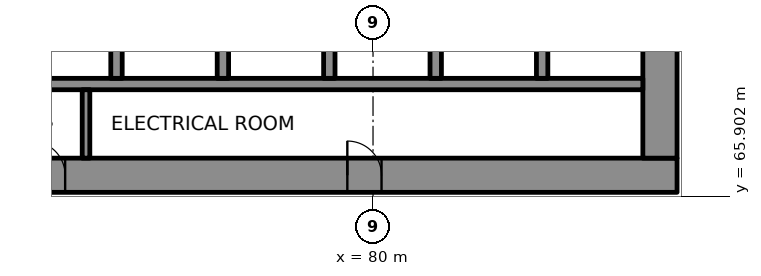
"""IFC4 building model, lengths in metres.
Left out: names, types, materials, properties, quantities, classifications, styles, units other than length and angle.
Written with IfcOpenShell. Run it as: python <this file> out.ifc"""

import sys

from ifc_helpers import new_model, si_unit, direction, frame, frame_2d, origin, place, context, subcontext, project, spatial, rectangle, extrude, element, fill, save


model = new_model("IFC4")
c1 = context("Model", 3, precision=1e-05, world=origin(), true_north=direction((0.0, 1.0)))
c2 = subcontext(c1, "Body", "Model", "MODEL_VIEW")
j1 = project(units=[si_unit("LENGTHUNIT", "METRE"), si_unit("PLANEANGLEUNIT", "RADIAN")], contexts=[c1])
p1 = place(None, origin())
s1 = spatial("IfcSite", under=j1, at=p1, CompositionType="ELEMENT")
p2 = place(p1, origin())
s2 = spatial("IfcBuilding", under=s1, at=p2, CompositionType="ELEMENT")
p3 = place(p2, frame((0.0, 0.0, 35.5)))
s3 = spatial("IfcBuildingStorey", under=s2, at=p3, CompositionType="ELEMENT", Elevation=35.5)
p4 = place(p3, frame((62.0, 66.45, 0.0), z_axis=(0.0, 0.0, 1.0), x_axis=(1.0, 0.0, 0.0)))
e1 = element("IfcWall", 1, at=p4, inside=s3, PredefinedType="SHEAR", context=c2, shape_type="SweptSolid", body=[
    extrude(rectangle(XDim=26.0, YDim=0.9, at=frame_2d((13.0, 0.0))), origin(), (0.0, 0.0, 1.0), 4.3),
])
p5 = place(p4, frame((3.45, 0.0, 0.0)))
e2 = element("IfcOpeningElement", 2, at=p5, cuts=e1, PredefinedType="OPENING", context=c2, shape_type="SweptSolid", body=[
    extrude(rectangle(XDim=0.9, YDim=2.1, at=frame_2d((0.45, 1.05))), frame((0.0, 0.46, 0.0), z_axis=(0.0, -1.0, 0.0), x_axis=(1.0, 0.0, 0.0)), (0.0, 0.0, 1.0), 0.92),
])
p6 = place(p4, frame((5.637, 0.0, 0.0)))
e3 = element("IfcOpeningElement", 3, at=p6, cuts=e1, PredefinedType="OPENING", context=c2, shape_type="SweptSolid", body=[
    extrude(rectangle(XDim=0.9, YDim=2.1, at=frame_2d((0.45, 1.05))), frame((0.0, 0.46, 0.0), z_axis=(0.0, -1.0, 0.0), x_axis=(1.0, 0.0, 0.0)), (0.0, 0.0, 1.0), 0.92),
])
p7 = place(p4, frame((7.212, 0.0, 0.0)))
e4 = element("IfcOpeningElement", 4, at=p7, cuts=e1, PredefinedType="OPENING", context=c2, shape_type="SweptSolid", body=[
    extrude(rectangle(XDim=0.9, YDim=2.1, at=frame_2d((0.45, 1.05))), frame((0.0, 0.46, 0.0), z_axis=(0.0, -1.0, 0.0), x_axis=(1.0, 0.0, 0.0)), (0.0, 0.0, 1.0), 0.92),
])
p8 = place(p4, frame((8.999, 0.0, 0.0)))
e5 = element("IfcOpeningElement", 5, at=p8, cuts=e1, PredefinedType="OPENING", context=c2, shape_type="SweptSolid", body=[
    extrude(rectangle(XDim=0.9, YDim=2.1, at=frame_2d((0.45, 1.05))), frame((0.0, 0.46, 0.0), z_axis=(0.0, -1.0, 0.0), x_axis=(1.0, 0.0, 0.0)), (0.0, 0.0, 1.0), 0.92),
])
p9 = place(p4, frame((17.324, 0.0, 0.0)))
e6 = element("IfcOpeningElement", 6, at=p9, cuts=e1, PredefinedType="OPENING", context=c2, shape_type="SweptSolid", body=[
    extrude(rectangle(XDim=0.9, YDim=2.1, at=frame_2d((0.45, 1.05))), frame((0.0, 0.46, 0.0), z_axis=(0.0, -1.0, 0.0), x_axis=(1.0, 0.0, 0.0)), (0.0, 0.0, 1.0), 0.92),
])
p10 = place(p3, frame((87.55, 66.9, 0.0), z_axis=(0.0, 0.0, 1.0), x_axis=(0.0, 1.0, 0.0)))
e7 = element("IfcWall", 7, at=p10, inside=s3, PredefinedType="SHEAR", context=c2, shape_type="SweptSolid", body=[
    extrude(rectangle(XDim=16.2, YDim=0.9, at=frame_2d((8.1, 0.0))), origin(), (0.0, 0.0, 1.0), 4.3),
])
p11 = place(p10, frame((5.5, 0.0, 0.0)))
e8 = element("IfcOpeningElement", 8, at=p11, cuts=e7, PredefinedType="OPENING", context=c2, shape_type="SweptSolid", body=[
    extrude(rectangle(XDim=1.8, YDim=2.1, at=frame_2d((0.9, 1.05))), frame((0.0, 0.46, 0.0), z_axis=(0.0, -1.0, 0.0), x_axis=(1.0, 0.0, 0.0)), (0.0, 0.0, 1.0), 0.92),
])
p12 = place(p10, frame((11.202, 0.0, 0.0)))
e9 = element("IfcOpeningElement", 9, at=p12, cuts=e7, PredefinedType="OPENING", context=c2, shape_type="SweptSolid", body=[
    extrude(rectangle(XDim=0.9, YDim=2.1, at=frame_2d((0.45, 1.05))), frame((0.0, 0.46, 0.0), z_axis=(0.0, -1.0, 0.0), x_axis=(1.0, 0.0, 0.0)), (0.0, 0.0, 1.0), 0.92),
])
p13 = place(p3, frame((70.35, 68.85, 0.0), z_axis=(0.0, 0.0, 1.0), x_axis=(1.0, 0.0, 0.0)))
e10 = element("IfcWall", 10, at=p13, inside=s3, PredefinedType="SHEAR", context=c2, shape_type="SweptSolid", body=[
    extrude(rectangle(XDim=16.75, YDim=0.3, at=frame_2d((8.375, 0.0))), origin(), (0.0, 0.0, 1.0), 4.3),
])
for number, where, z_axis, x_axis in (
    (11, (73.25, 69.0, 0.0), (0.0, 0.0, 1.0), (0.0, 1.0, 0.0)),
    (12, (76.05, 69.0, 0.0), (0.0, 0.0, 1.0), (0.0, 1.0, 0.0)),
    (13, (78.85, 69.0, 0.0), (0.0, 0.0, 1.0), (0.0, 1.0, 0.0)),
    (14, (81.65, 69.0, 0.0), (0.0, 0.0, 1.0), (0.0, 1.0, 0.0)),
    (15, (84.45, 69.0, 0.0), (0.0, 0.0, 1.0), (0.0, 1.0, 0.0)),
):
    element("IfcWall", number, at=place(p3, frame(where, z_axis=z_axis, x_axis=x_axis)), inside=s3, PredefinedType="SHEAR", context=c2, shape_type="SweptSolid", body=[
        extrude(rectangle(XDim=2.6, YDim=0.3, at=frame_2d((1.3, 0.0))), origin(), (0.0, 0.0, 1.0), 4.3),
    ])
p14 = place(p3, frame((107.504, 60.451, 0.0), z_axis=(0.0, 0.0, 1.0), x_axis=(-0.500000550228, 0.86602508611, 0.0)))
e16 = element("IfcWall", 16, at=p14, inside=s3, PredefinedType="SOLIDWALL", context=c2, shape_type="SweptSolid", body=[
    extrude(rectangle(XDim=57.704, YDim=0.3, at=frame_2d((28.852, 0.0))), origin(), (0.0, 0.0, 1.0), 4.3),
])
p15 = place(p14, frame((0.89, 0.0, 0.8)))
e17 = element("IfcOpeningElement", 17, at=p15, cuts=e16, PredefinedType="OPENING", context=c2, shape_type="SweptSolid", body=[
    extrude(rectangle(XDim=3.0, YDim=2.4, at=frame_2d((1.5, 1.2))), frame((0.0, 0.16, 0.0), z_axis=(0.0, -1.0, 0.0), x_axis=(1.0, 0.0, 0.0)), (0.0, 0.0, 1.0), 0.32),
])
p16 = place(p14, frame((4.67, 0.0, 0.8)))
e18 = element("IfcOpeningElement", 18, at=p16, cuts=e16, PredefinedType="OPENING", context=c2, shape_type="SweptSolid", body=[
    extrude(rectangle(XDim=3.0, YDim=2.4, at=frame_2d((1.5, 1.2))), frame((0.0, 0.16, 0.0), z_axis=(0.0, -1.0, 0.0), x_axis=(1.0, 0.0, 0.0)), (0.0, 0.0, 1.0), 0.32),
])
p17 = place(p14, frame((8.451, 0.0, 0.8)))
e19 = element("IfcOpeningElement", 19, at=p17, cuts=e16, PredefinedType="OPENING", context=c2, shape_type="SweptSolid", body=[
    extrude(rectangle(XDim=3.0, YDim=2.4, at=frame_2d((1.5, 1.2))), frame((0.0, 0.16, 0.0), z_axis=(0.0, -1.0, 0.0), x_axis=(1.0, 0.0, 0.0)), (0.0, 0.0, 1.0), 0.32),
])
p18 = place(p14, frame((12.231, 0.0, 0.8)))
e20 = element("IfcOpeningElement", 20, at=p18, cuts=e16, PredefinedType="OPENING", context=c2, shape_type="SweptSolid", body=[
    extrude(rectangle(XDim=3.0, YDim=2.4, at=frame_2d((1.5, 1.2))), frame((0.0, 0.16, 0.0), z_axis=(0.0, -1.0, 0.0), x_axis=(1.0, 0.0, 0.0)), (0.0, 0.0, 1.0), 0.32),
])
p19 = place(p14, frame((16.011, 0.0, 0.8)))
e21 = element("IfcOpeningElement", 21, at=p19, cuts=e16, PredefinedType="OPENING", context=c2, shape_type="SweptSolid", body=[
    extrude(rectangle(XDim=3.0, YDim=2.4, at=frame_2d((1.5, 1.2))), frame((0.0, 0.16, 0.0), z_axis=(0.0, -1.0, 0.0), x_axis=(1.0, 0.0, 0.0)), (0.0, 0.0, 1.0), 0.32),
])
p20 = place(p14, frame((19.792, 0.0, 0.8)))
e22 = element("IfcOpeningElement", 22, at=p20, cuts=e16, PredefinedType="OPENING", context=c2, shape_type="SweptSolid", body=[
    extrude(rectangle(XDim=3.0, YDim=2.4, at=frame_2d((1.5, 1.2))), frame((0.0, 0.16, 0.0), z_axis=(0.0, -1.0, 0.0), x_axis=(1.0, 0.0, 0.0)), (0.0, 0.0, 1.0), 0.32),
])
p21 = place(p14, frame((23.572, 0.0, 0.8)))
e23 = element("IfcOpeningElement", 23, at=p21, cuts=e16, PredefinedType="OPENING", context=c2, shape_type="SweptSolid", body=[
    extrude(rectangle(XDim=3.0, YDim=2.4, at=frame_2d((1.5, 1.2))), frame((0.0, 0.16, 0.0), z_axis=(0.0, -1.0, 0.0), x_axis=(1.0, 0.0, 0.0)), (0.0, 0.0, 1.0), 0.32),
])
p22 = place(p14, frame((27.352, 0.0, 0.8)))
e24 = element("IfcOpeningElement", 24, at=p22, cuts=e16, PredefinedType="OPENING", context=c2, shape_type="SweptSolid", body=[
    extrude(rectangle(XDim=3.0, YDim=2.4, at=frame_2d((1.5, 1.2))), frame((0.0, 0.16, 0.0), z_axis=(0.0, -1.0, 0.0), x_axis=(1.0, 0.0, 0.0)), (0.0, 0.0, 1.0), 0.32),
])
p23 = place(p14, frame((31.132, 0.0, 0.8)))
e25 = element("IfcOpeningElement", 25, at=p23, cuts=e16, PredefinedType="OPENING", context=c2, shape_type="SweptSolid", body=[
    extrude(rectangle(XDim=3.0, YDim=2.4, at=frame_2d((1.5, 1.2))), frame((0.0, 0.16, 0.0), z_axis=(0.0, -1.0, 0.0), x_axis=(1.0, 0.0, 0.0)), (0.0, 0.0, 1.0), 0.32),
])
p24 = place(p14, frame((34.913, 0.0, 0.8)))
e26 = element("IfcOpeningElement", 26, at=p24, cuts=e16, PredefinedType="OPENING", context=c2, shape_type="SweptSolid", body=[
    extrude(rectangle(XDim=3.0, YDim=2.4, at=frame_2d((1.5, 1.2))), frame((0.0, 0.16, 0.0), z_axis=(0.0, -1.0, 0.0), x_axis=(1.0, 0.0, 0.0)), (0.0, 0.0, 1.0), 0.32),
])
p25 = place(p14, frame((38.693, 0.0, 0.8)))
e27 = element("IfcOpeningElement", 27, at=p25, cuts=e16, PredefinedType="OPENING", context=c2, shape_type="SweptSolid", body=[
    extrude(rectangle(XDim=3.0, YDim=2.4, at=frame_2d((1.5, 1.2))), frame((0.0, 0.16, 0.0), z_axis=(0.0, -1.0, 0.0), x_axis=(1.0, 0.0, 0.0)), (0.0, 0.0, 1.0), 0.32),
])
p26 = place(p14, frame((42.473, 0.0, 0.8)))
e28 = element("IfcOpeningElement", 28, at=p26, cuts=e16, PredefinedType="OPENING", context=c2, shape_type="SweptSolid", body=[
    extrude(rectangle(XDim=3.0, YDim=2.4, at=frame_2d((1.5, 1.2))), frame((0.0, 0.16, 0.0), z_axis=(0.0, -1.0, 0.0), x_axis=(1.0, 0.0, 0.0)), (0.0, 0.0, 1.0), 0.32),
])
p27 = place(p14, frame((46.253, 0.0, 0.8)))
e29 = element("IfcOpeningElement", 29, at=p27, cuts=e16, PredefinedType="OPENING", context=c2, shape_type="SweptSolid", body=[
    extrude(rectangle(XDim=3.0, YDim=2.4, at=frame_2d((1.5, 1.2))), frame((0.0, 0.16, 0.0), z_axis=(0.0, -1.0, 0.0), x_axis=(1.0, 0.0, 0.0)), (0.0, 0.0, 1.0), 0.32),
])
p28 = place(p14, frame((50.033, 0.0, 0.8)))
e30 = element("IfcOpeningElement", 30, at=p28, cuts=e16, PredefinedType="OPENING", context=c2, shape_type="SweptSolid", body=[
    extrude(rectangle(XDim=3.0, YDim=2.4, at=frame_2d((1.5, 1.2))), frame((0.0, 0.16, 0.0), z_axis=(0.0, -1.0, 0.0), x_axis=(1.0, 0.0, 0.0)), (0.0, 0.0, 1.0), 0.32),
])
p29 = place(p14, frame((53.814, 0.0, 0.8)))
e31 = element("IfcOpeningElement", 31, at=p29, cuts=e16, PredefinedType="OPENING", context=c2, shape_type="SweptSolid", body=[
    extrude(rectangle(XDim=3.0, YDim=2.4, at=frame_2d((1.5, 1.2))), frame((0.0, 0.16, 0.0), z_axis=(0.0, -1.0, 0.0), x_axis=(1.0, 0.0, 0.0)), (0.0, 0.0, 1.0), 0.32),
])
p30 = place(p3, frame((72.448, 66.9, 0.0), z_axis=(0.0, 0.0, 1.0), x_axis=(0.0, 1.0, 0.0)))
e32 = element("IfcWall", 32, at=p30, inside=s3, PredefinedType="PARTITIONING", context=c2, shape_type="SweptSolid", body=[
    extrude(rectangle(XDim=1.8, YDim=0.2, at=frame_2d((0.9, 0.0))), origin(), (0.0, 0.0, 1.0), 4.3),
])
p31 = place(p8, origin())
e33 = element("IfcDoor", 33, at=p31, inside=s3, OperationType="SINGLE_SWING_RIGHT", PredefinedType="DOOR", context=c2, shape_type="SweptSolid", body=[
    extrude(rectangle(XDim=0.9, YDim=2.1, at=frame_2d((0.45, 1.05))), frame((0.0, 0.17, 0.0), z_axis=(0.0, -1.0, 0.0), x_axis=(1.0, 0.0, 0.0)), (0.0, 0.0, 1.0), 0.34),
])
fill(e5, e33)
p32 = place(p9, origin())
e34 = element("IfcDoor", 34, at=p32, inside=s3, OperationType="SINGLE_SWING_LEFT", PredefinedType="DOOR", context=c2, shape_type="SweptSolid", body=[
    extrude(rectangle(XDim=0.9, YDim=2.1, at=frame_2d((0.45, 1.05))), frame((0.0, 0.17, 0.0), z_axis=(0.0, -1.0, 0.0), x_axis=(1.0, 0.0, 0.0)), (0.0, 0.0, 1.0), 0.34),
])
fill(e6, e34)
save(model, sys.argv[1])
